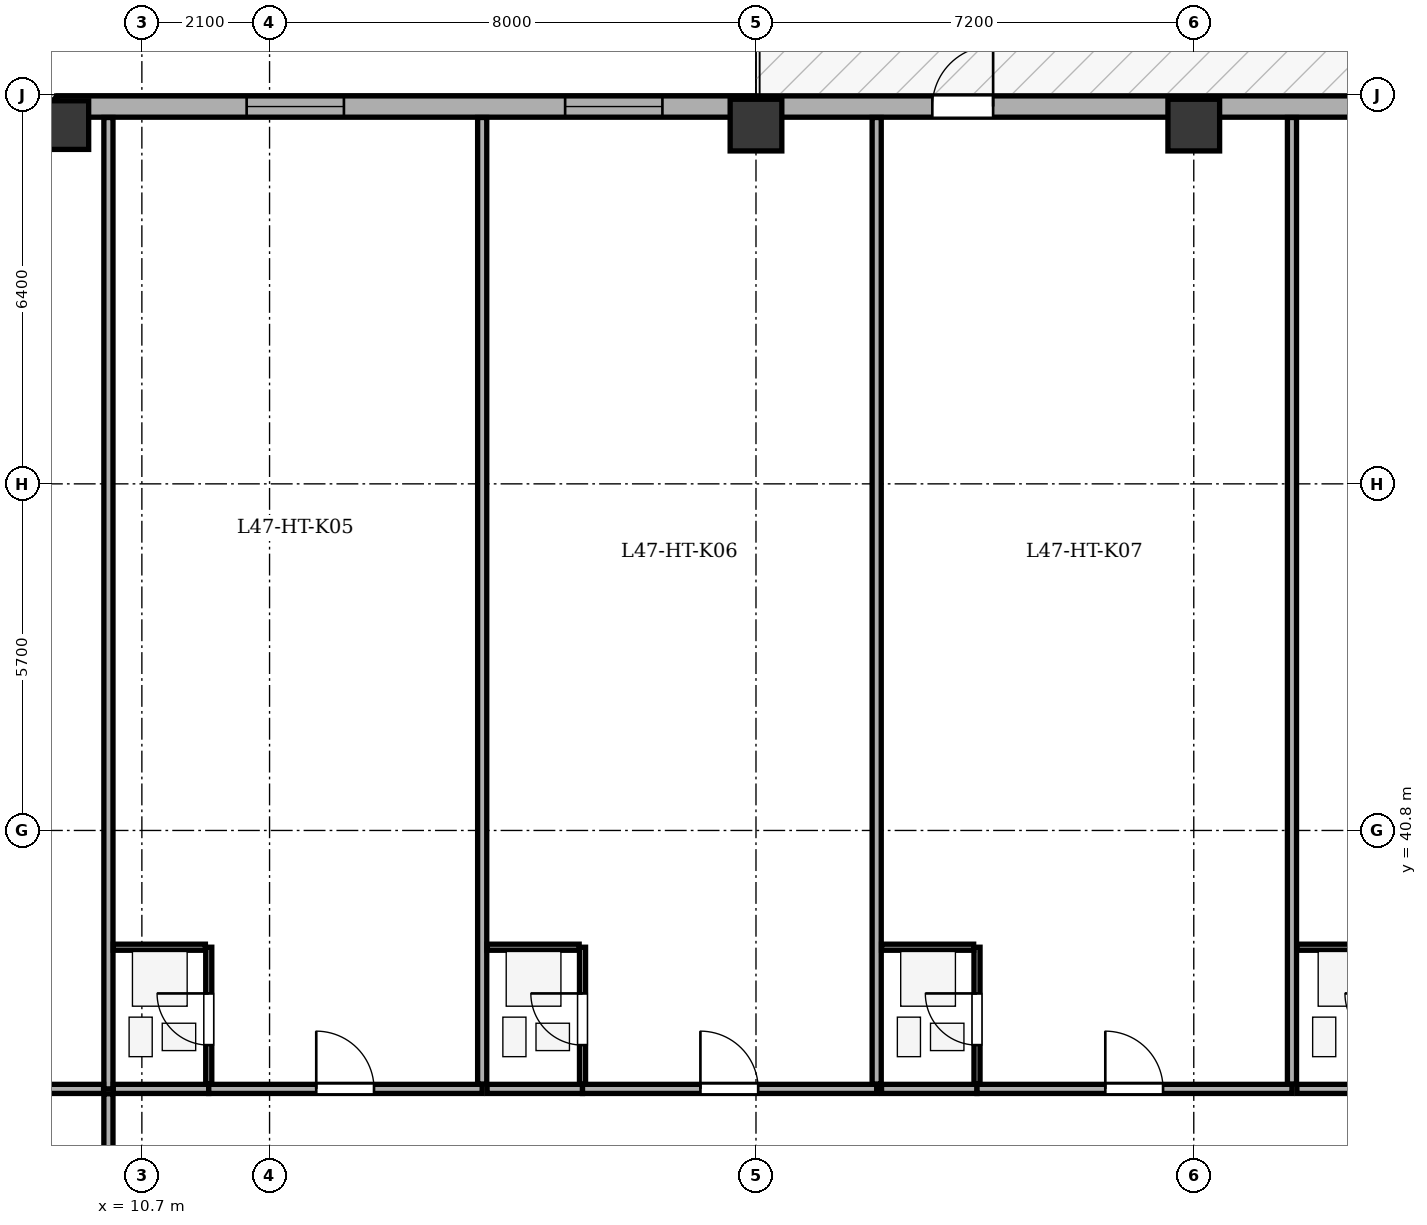
"""IFC4 building model, lengths in metres.
Left out: names, types, materials, properties, quantities, classifications, styles, units other than length and angle.
Written with IfcOpenShell. Run it as: python <this file> out.ifc"""

import sys

from ifc_helpers import new_model, si_unit, direction, frame, frame_2d, origin, origin_2d, place, context, subcontext, project, spatial, rectangle, extrude, element, fill, save


model = new_model("IFC4")
c1 = context("Model", 3, precision=1e-05, world=origin(), true_north=direction((0.0, 1.0)))
c2 = subcontext(c1, "Body", "Model", "MODEL_VIEW")
j1 = project(units=[si_unit("LENGTHUNIT", "METRE"), si_unit("PLANEANGLEUNIT", "RADIAN")], contexts=[c1])
p1 = place(None, origin())
s1 = spatial("IfcSite", under=j1, at=p1, CompositionType="ELEMENT")
p2 = place(p1, origin())
s2 = spatial("IfcBuilding", under=s1, at=p2, CompositionType="ELEMENT")
p3 = place(p2, frame((0.0, 0.0, 183.3)))
s3 = spatial("IfcBuildingStorey", under=s2, at=p3, CompositionType="ELEMENT", Elevation=183.3)
p4 = place(p3, frame((9.3, 52.4, 0.0), z_axis=(0.0, 0.0, 1.0), x_axis=(1.0, 0.0, 0.0)))
e1 = element("IfcColumn", 1, at=p4, inside=s3, PredefinedType="COLUMN", context=c2, shape_type="SweptSolid", body=[
    extrude(rectangle(XDim=0.8, YDim=1.05, at=origin_2d()), origin(), (0.0, 0.0, 1.0), 3.5),
])
for number, where, z_axis, x_axis in (
    (2, (20.8, 52.4, 0.0), (0.0, 0.0, 1.0), (1.0, 0.0, 0.0)),
    (3, (28.0, 52.4, 0.0), (0.0, 0.0, 1.0), (1.0, 0.0, 0.0)),
):
    element("IfcColumn", number, at=place(p3, frame(where, z_axis=z_axis, x_axis=x_axis)), inside=s3, PredefinedType="COLUMN", context=c2, shape_type="SweptSolid", body=[
        extrude(rectangle(XDim=0.85, YDim=0.85, at=origin_2d()), origin(), (0.0, 0.0, 1.0), 3.5),
    ])
p5 = place(p3, frame((4.495, 47.9, 0.0), z_axis=(0.0, 0.0, 1.0), x_axis=(0.707088817216, 0.7071247447, 0.0)))
e4 = element("IfcWall", 4, at=p5, inside=s3, PredefinedType="STANDARD", context=c2, shape_type="SweptSolid", body=[
    extrude(rectangle(XDim=6.795, YDim=0.35, at=frame_2d((3.398, 0.0))), origin(), (0.0, 0.0, 1.0), 2.785),
])
p6 = place(p5, frame((2.698, 0.0, 0.75)))
e5 = element("IfcOpeningElement", 5, at=p6, cuts=e4, PredefinedType="OPENING", context=c2, shape_type="SweptSolid", body=[
    extrude(rectangle(XDim=1.4, YDim=1.65, at=frame_2d((0.7, 0.825))), frame((0.0, 0.185, 0.0), z_axis=(0.0, -1.0, 0.0), x_axis=(1.0, 0.0, 0.0)), (0.0, 0.0, 1.0), 0.37),
])
p7 = place(p3, frame((9.3, 52.705, 0.0), z_axis=(0.0, 0.0, 1.0), x_axis=(1.0, 0.0, 0.0)))
e6 = element("IfcWall", 6, at=p7, inside=s3, PredefinedType="STANDARD", context=c2, shape_type="SweptSolid", body=[
    extrude(rectangle(XDim=35.0, YDim=0.35, at=frame_2d((17.5, 0.0))), origin(), (0.0, 0.0, 1.0), 2.785),
])
p8 = place(p7, frame((14.4, 0.0, 0.0)))
e7 = element("IfcOpeningElement", 7, at=p8, cuts=e6, PredefinedType="OPENING", context=c2, shape_type="SweptSolid", body=[
    extrude(rectangle(XDim=1.0, YDim=2.02, at=frame_2d((0.5, 1.01))), frame((0.0, 0.185, 0.0), z_axis=(0.0, -1.0, 0.0), x_axis=(1.0, 0.0, 0.0)), (0.0, 0.0, 1.0), 0.37),
])
p9 = place(p7, frame((3.123, 0.0, 0.75)))
e8 = element("IfcOpeningElement", 8, at=p9, cuts=e6, PredefinedType="OPENING", context=c2, shape_type="SweptSolid", body=[
    extrude(rectangle(XDim=1.6, YDim=1.75, at=frame_2d((0.8, 0.875))), frame((0.0, 0.185, 0.0), z_axis=(0.0, -1.0, 0.0), x_axis=(1.0, 0.0, 0.0)), (0.0, 0.0, 1.0), 0.37),
])
p10 = place(p7, frame((8.361, 0.0, 0.75)))
e9 = element("IfcOpeningElement", 9, at=p10, cuts=e6, PredefinedType="OPENING", context=c2, shape_type="SweptSolid", body=[
    extrude(rectangle(XDim=1.6, YDim=1.75, at=frame_2d((0.8, 0.875))), frame((0.0, 0.185, 0.0), z_axis=(0.0, -1.0, 0.0), x_axis=(1.0, 0.0, 0.0)), (0.0, 0.0, 1.0), 0.37),
])
p11 = place(p7, frame((22.22, 0.0, 0.75)))
e10 = element("IfcOpeningElement", 10, at=p11, cuts=e6, PredefinedType="OPENING", context=c2, shape_type="SweptSolid", body=[
    extrude(rectangle(XDim=1.6, YDim=1.75, at=frame_2d((0.8, 0.875))), frame((0.0, 0.185, 0.0), z_axis=(0.0, -1.0, 0.0), x_axis=(1.0, 0.0, 0.0)), (0.0, 0.0, 1.0), 0.37),
])
p12 = place(p7, frame((28.809, 0.0, 0.75)))
e11 = element("IfcOpeningElement", 11, at=p12, cuts=e6, PredefinedType="OPENING", context=c2, shape_type="SweptSolid", body=[
    extrude(rectangle(XDim=1.6, YDim=1.75, at=frame_2d((0.8, 0.875))), frame((0.0, 0.185, 0.0), z_axis=(0.0, -1.0, 0.0), x_axis=(1.0, 0.0, 0.0)), (0.0, 0.0, 1.0), 0.37),
])
p13 = place(p7, frame((31.803, 0.0, 0.75)))
e12 = element("IfcOpeningElement", 12, at=p13, cuts=e6, PredefinedType="OPENING", context=c2, shape_type="SweptSolid", body=[
    extrude(rectangle(XDim=1.6, YDim=1.75, at=frame_2d((0.8, 0.875))), frame((0.0, 0.185, 0.0), z_axis=(0.0, -1.0, 0.0), x_axis=(1.0, 0.0, 0.0)), (0.0, 0.0, 1.0), 0.37),
])
p14 = place(p3, frame((10.15, 36.55, 0.0), z_axis=(0.0, 0.0, 1.0), x_axis=(0.0, 1.0, 0.0)))
e13 = element("IfcWall", 13, at=p14, inside=s3, PredefinedType="PARTITIONING", context=c2, shape_type="SweptSolid", body=[
    extrude(rectangle(XDim=15.975, YDim=0.15, at=frame_2d((7.987, 0.0))), origin(), (0.0, 0.0, 1.0), 3.2),
])
p15 = place(p3, frame((10.23, 36.55, 0.0), z_axis=(0.0, 0.0, 1.0), x_axis=(1.0, 0.0, 0.0)))
e14 = element("IfcWall", 14, at=p15, inside=s3, PredefinedType="PARTITIONING", context=c2, shape_type="SweptSolid", body=[
    extrude(rectangle(XDim=1.57, YDim=0.15, at=frame_2d((0.785, 0.0))), origin(), (0.0, 0.0, 1.0), 3.2),
])
p16 = place(p3, frame((11.8, 36.55, 0.0), z_axis=(0.0, 0.0, 1.0), x_axis=(1.0, 0.0, 0.0)))
e15 = element("IfcWall", 15, at=p16, inside=s3, PredefinedType="PARTITIONING", context=c2, shape_type="SweptSolid", body=[
    extrude(rectangle(XDim=4.497, YDim=0.15, at=frame_2d((2.249, 0.0))), origin(), (0.0, 0.0, 1.0), 3.2),
])
p17 = place(p16, frame((1.768, 0.0, 0.0)))
e16 = element("IfcOpeningElement", 16, at=p17, cuts=e15, PredefinedType="OPENING", context=c2, shape_type="SweptSolid", body=[
    extrude(rectangle(XDim=0.95, YDim=2.1, at=frame_2d((0.475, 1.05))), frame((0.0, 0.085, 0.0), z_axis=(0.0, -1.0, 0.0), x_axis=(1.0, 0.0, 0.0)), (0.0, 0.0, 1.0), 0.17),
])
p18 = place(p3, frame((11.8, 36.63, 0.0), z_axis=(0.0, 0.0, 1.0), x_axis=(0.0, 1.0, 0.0)))
e17 = element("IfcWall", 17, at=p18, inside=s3, PredefinedType="PARTITIONING", context=c2, shape_type="SweptSolid", body=[
    extrude(rectangle(XDim=2.25, YDim=0.1, at=frame_2d((1.125, 0.0))), origin(), (0.0, 0.0, 1.0), 3.2),
])
p19 = place(p18, frame((0.64, 0.0, 0.0)))
e18 = element("IfcOpeningElement", 18, at=p19, cuts=e17, PredefinedType="OPENING", context=c2, shape_type="SweptSolid", body=[
    extrude(rectangle(XDim=0.85, YDim=2.05, at=frame_2d((0.425, 1.025))), frame((0.0, 0.06, 0.0), z_axis=(0.0, -1.0, 0.0), x_axis=(1.0, 0.0, 0.0)), (0.0, 0.0, 1.0), 0.12),
])
p20 = place(p3, frame((10.23, 38.88, 0.0), z_axis=(0.0, 0.0, 1.0), x_axis=(1.0, 0.0, 0.0)))
e19 = element("IfcWall", 19, at=p20, inside=s3, PredefinedType="PARTITIONING", context=c2, shape_type="SweptSolid", body=[
    extrude(rectangle(XDim=1.515, YDim=0.1, at=frame_2d((0.758, 0.0))), origin(), (0.0, 0.0, 1.0), 3.2),
])
p21 = place(p3, frame((16.297, 36.63, 0.0), z_axis=(0.0, 0.0, 1.0), x_axis=(0.0, 1.0, 0.0)))
e20 = element("IfcWall", 20, at=p21, inside=s3, PredefinedType="PARTITIONING", context=c2, shape_type="SweptSolid", body=[
    extrude(rectangle(XDim=15.895, YDim=0.15, at=frame_2d((7.948, 0.0))), origin(), (0.0, 0.0, 1.0), 3.2),
])
p22 = place(p3, frame((16.377, 36.55, 0.0), z_axis=(0.0, 0.0, 1.0), x_axis=(1.0, 0.0, 0.0)))
e21 = element("IfcWall", 21, at=p22, inside=s3, PredefinedType="PARTITIONING", context=c2, shape_type="SweptSolid", body=[
    extrude(rectangle(XDim=1.57, YDim=0.15, at=frame_2d((0.785, 0.0))), origin(), (0.0, 0.0, 1.0), 3.2),
])
p23 = place(p3, frame((17.947, 36.55, 0.0), z_axis=(0.0, 0.0, 1.0), x_axis=(1.0, 0.0, 0.0)))
e22 = element("IfcWall", 22, at=p23, inside=s3, PredefinedType="PARTITIONING", context=c2, shape_type="SweptSolid", body=[
    extrude(rectangle(XDim=4.838, YDim=0.15, at=frame_2d((2.419, 0.0))), origin(), (0.0, 0.0, 1.0), 3.2),
])
p24 = place(p23, frame((1.939, 0.0, 0.0)))
e23 = element("IfcOpeningElement", 23, at=p24, cuts=e22, PredefinedType="OPENING", context=c2, shape_type="SweptSolid", body=[
    extrude(rectangle(XDim=0.95, YDim=2.1, at=frame_2d((0.475, 1.05))), frame((0.0, 0.085, 0.0), z_axis=(0.0, -1.0, 0.0), x_axis=(1.0, 0.0, 0.0)), (0.0, 0.0, 1.0), 0.17),
])
p25 = place(p3, frame((17.947, 36.63, 0.0), z_axis=(0.0, 0.0, 1.0), x_axis=(0.0, 1.0, 0.0)))
e24 = element("IfcWall", 24, at=p25, inside=s3, PredefinedType="PARTITIONING", context=c2, shape_type="SweptSolid", body=[
    extrude(rectangle(XDim=2.25, YDim=0.1, at=frame_2d((1.125, 0.0))), origin(), (0.0, 0.0, 1.0), 3.2),
])
p26 = place(p25, frame((0.64, 0.0, 0.0)))
e25 = element("IfcOpeningElement", 25, at=p26, cuts=e24, PredefinedType="OPENING", context=c2, shape_type="SweptSolid", body=[
    extrude(rectangle(XDim=0.85, YDim=2.05, at=frame_2d((0.425, 1.025))), frame((0.0, 0.06, 0.0), z_axis=(0.0, -1.0, 0.0), x_axis=(1.0, 0.0, 0.0)), (0.0, 0.0, 1.0), 0.12),
])
p27 = place(p3, frame((16.377, 38.88, 0.0), z_axis=(0.0, 0.0, 1.0), x_axis=(1.0, 0.0, 0.0)))
e26 = element("IfcWall", 26, at=p27, inside=s3, PredefinedType="PARTITIONING", context=c2, shape_type="SweptSolid", body=[
    extrude(rectangle(XDim=1.515, YDim=0.1, at=frame_2d((0.758, 0.0))), origin(), (0.0, 0.0, 1.0), 3.2),
])
p28 = place(p3, frame((22.785, 36.63, 0.0), z_axis=(0.0, 0.0, 1.0), x_axis=(0.0, 1.0, 0.0)))
e27 = element("IfcWall", 27, at=p28, inside=s3, PredefinedType="PARTITIONING", context=c2, shape_type="SweptSolid", body=[
    extrude(rectangle(XDim=15.895, YDim=0.15, at=frame_2d((7.948, 0.0))), origin(), (0.0, 0.0, 1.0), 3.2),
])
p29 = place(p3, frame((22.865, 36.55, 0.0), z_axis=(0.0, 0.0, 1.0), x_axis=(1.0, 0.0, 0.0)))
e28 = element("IfcWall", 28, at=p29, inside=s3, PredefinedType="PARTITIONING", context=c2, shape_type="SweptSolid", body=[
    extrude(rectangle(XDim=1.57, YDim=0.15, at=frame_2d((0.785, 0.0))), origin(), (0.0, 0.0, 1.0), 3.2),
])
p30 = place(p3, frame((24.435, 36.55, 0.0), z_axis=(0.0, 0.0, 1.0), x_axis=(1.0, 0.0, 0.0)))
e29 = element("IfcWall", 29, at=p30, inside=s3, PredefinedType="PARTITIONING", context=c2, shape_type="SweptSolid", body=[
    extrude(rectangle(XDim=5.18, YDim=0.15, at=frame_2d((2.59, 0.0))), origin(), (0.0, 0.0, 1.0), 3.2),
])
p31 = place(p30, frame((2.11, 0.0, 0.0)))
e30 = element("IfcOpeningElement", 30, at=p31, cuts=e29, PredefinedType="OPENING", context=c2, shape_type="SweptSolid", body=[
    extrude(rectangle(XDim=0.95, YDim=2.1, at=frame_2d((0.475, 1.05))), frame((0.0, 0.085, 0.0), z_axis=(0.0, -1.0, 0.0), x_axis=(1.0, 0.0, 0.0)), (0.0, 0.0, 1.0), 0.17),
])
p32 = place(p3, frame((24.435, 36.63, 0.0), z_axis=(0.0, 0.0, 1.0), x_axis=(0.0, 1.0, 0.0)))
e31 = element("IfcWall", 31, at=p32, inside=s3, PredefinedType="PARTITIONING", context=c2, shape_type="SweptSolid", body=[
    extrude(rectangle(XDim=2.25, YDim=0.1, at=frame_2d((1.125, 0.0))), origin(), (0.0, 0.0, 1.0), 3.2),
])
p33 = place(p32, frame((0.64, 0.0, 0.0)))
e32 = element("IfcOpeningElement", 32, at=p33, cuts=e31, PredefinedType="OPENING", context=c2, shape_type="SweptSolid", body=[
    extrude(rectangle(XDim=0.85, YDim=2.05, at=frame_2d((0.425, 1.025))), frame((0.0, 0.06, 0.0), z_axis=(0.0, -1.0, 0.0), x_axis=(1.0, 0.0, 0.0)), (0.0, 0.0, 1.0), 0.12),
])
p34 = place(p3, frame((22.865, 38.88, 0.0), z_axis=(0.0, 0.0, 1.0), x_axis=(1.0, 0.0, 0.0)))
e33 = element("IfcWall", 33, at=p34, inside=s3, PredefinedType="PARTITIONING", context=c2, shape_type="SweptSolid", body=[
    extrude(rectangle(XDim=1.515, YDim=0.1, at=frame_2d((0.757, 0.0))), origin(), (0.0, 0.0, 1.0), 3.2),
])
p35 = place(p3, frame((29.615, 36.63, 0.0), z_axis=(0.0, 0.0, 1.0), x_axis=(0.0, 1.0, 0.0)))
e34 = element("IfcWall", 34, at=p35, inside=s3, PredefinedType="PARTITIONING", context=c2, shape_type="SweptSolid", body=[
    extrude(rectangle(XDim=15.895, YDim=0.15, at=frame_2d((7.948, 0.0))), origin(), (0.0, 0.0, 1.0), 2.785),
])
p36 = place(p3, frame((29.695, 36.55, 0.0), z_axis=(0.0, 0.0, 1.0), x_axis=(1.0, 0.0, 0.0)))
e35 = element("IfcWall", 35, at=p36, inside=s3, PredefinedType="PARTITIONING", context=c2, shape_type="SweptSolid", body=[
    extrude(rectangle(XDim=1.641, YDim=0.15, at=frame_2d((0.821, 0.0))), origin(), (0.0, 0.0, 1.0), 3.2),
])
p37 = place(p3, frame((29.695, 38.88, 0.0), z_axis=(0.0, 0.0, 1.0), x_axis=(1.0, 0.0, 0.0)))
e36 = element("IfcWall", 36, at=p37, inside=s3, PredefinedType="PARTITIONING", context=c2, shape_type="SweptSolid", body=[
    extrude(rectangle(XDim=1.586, YDim=0.1, at=frame_2d((0.793, 0.0))), origin(), (0.0, 0.0, 1.0), 3.2),
])
p38 = place(p3, frame((4.675, 36.55, 0.0), z_axis=(0.0, 0.0, 1.0), x_axis=(1.0, 0.0, 0.0)))
e37 = element("IfcWall", 37, at=p38, inside=s3, PredefinedType="PARTITIONING", context=c2, shape_type="SweptSolid", body=[
    extrude(rectangle(XDim=5.395, YDim=0.15, at=frame_2d((2.698, 0.0))), origin(), (0.0, 0.0, 1.0), 3.2),
])
p39 = place(p3, frame((10.15, 17.93, 0.0), z_axis=(0.0, 0.0, 1.0), x_axis=(0.0, 1.0, 0.0)))
e38 = element("IfcWall", 38, at=p39, inside=s3, PredefinedType="PARTITIONING", context=c2, shape_type="SweptSolid", body=[
    extrude(rectangle(XDim=18.54, YDim=0.15, at=frame_2d((9.27, 0.0))), origin(), (0.0, 0.0, 1.0), 3.2),
])
p40 = place(p39, frame((8.79, 0.0, 0.0)))
e39 = element("IfcOpeningElement", 39, at=p40, cuts=e38, PredefinedType="OPENING", context=c2, shape_type="SweptSolid", body=[
    extrude(rectangle(XDim=0.95, YDim=2.1, at=frame_2d((0.475, 1.05))), frame((0.0, 0.085, 0.0), z_axis=(0.0, -1.0, 0.0), x_axis=(1.0, 0.0, 0.0)), (0.0, 0.0, 1.0), 0.17),
])
p41 = place(p8, origin())
e40 = element("IfcDoor", 40, at=p41, inside=s3, OperationType="SINGLE_SWING_RIGHT", PredefinedType="DOOR", context=c2, shape_type="SweptSolid", body=[
    extrude(rectangle(XDim=1.0, YDim=2.02, at=frame_2d((0.5, 1.01))), frame((0.0, 0.025, 0.0), z_axis=(0.0, -1.0, 0.0), x_axis=(1.0, 0.0, 0.0)), (0.0, 0.0, 1.0), 0.05),
])
fill(e7, e40)
p42 = place(p9, origin())
e41 = element("IfcWindow", 41, at=p42, inside=s3, PartitioningType="SINGLE_PANEL", PredefinedType="WINDOW", context=c2, shape_type="SweptSolid", body=[
    extrude(rectangle(XDim=1.6, YDim=1.75, at=frame_2d((0.8, 0.875))), frame((0.0, -0.01, 0.0), z_axis=(0.0, -1.0, 0.0), x_axis=(1.0, 0.0, 0.0)), (0.0, 0.0, 1.0), 0.06),
])
fill(e8, e41)
p43 = place(p10, origin())
e42 = element("IfcWindow", 42, at=p43, inside=s3, PartitioningType="SINGLE_PANEL", PredefinedType="WINDOW", context=c2, shape_type="SweptSolid", body=[
    extrude(rectangle(XDim=1.6, YDim=1.75, at=frame_2d((0.8, 0.875))), frame((0.0, -0.01, 0.0), z_axis=(0.0, -1.0, 0.0), x_axis=(1.0, 0.0, 0.0)), (0.0, 0.0, 1.0), 0.06),
])
fill(e9, e42)
p44 = place(p19, origin())
e43 = element("IfcDoor", 43, at=p44, inside=s3, OperationType="SINGLE_SWING_RIGHT", PredefinedType="DOOR", context=c2, shape_type="SweptSolid", body=[
    extrude(rectangle(XDim=0.85, YDim=2.05, at=frame_2d((0.425, 1.025))), frame((0.0, 0.025, 0.0), z_axis=(0.0, -1.0, 0.0), x_axis=(1.0, 0.0, 0.0)), (0.0, 0.0, 1.0), 0.05),
])
fill(e18, e43)
p45 = place(p17, origin())
e44 = element("IfcDoor", 44, at=p45, inside=s3, OperationType="SINGLE_SWING_LEFT", PredefinedType="DOOR", context=c2, shape_type="SweptSolid", body=[
    extrude(rectangle(XDim=0.95, YDim=2.1, at=frame_2d((0.475, 1.05))), frame((0.0, 0.025, 0.0), z_axis=(0.0, -1.0, 0.0), x_axis=(1.0, 0.0, 0.0)), (0.0, 0.0, 1.0), 0.05),
])
fill(e16, e44)
p46 = place(p26, origin())
e45 = element("IfcDoor", 45, at=p46, inside=s3, OperationType="SINGLE_SWING_RIGHT", PredefinedType="DOOR", context=c2, shape_type="SweptSolid", body=[
    extrude(rectangle(XDim=0.85, YDim=2.05, at=frame_2d((0.425, 1.025))), frame((0.0, 0.025, 0.0), z_axis=(0.0, -1.0, 0.0), x_axis=(1.0, 0.0, 0.0)), (0.0, 0.0, 1.0), 0.05),
])
fill(e25, e45)
p47 = place(p24, origin())
e46 = element("IfcDoor", 46, at=p47, inside=s3, OperationType="SINGLE_SWING_LEFT", PredefinedType="DOOR", context=c2, shape_type="SweptSolid", body=[
    extrude(rectangle(XDim=0.95, YDim=2.1, at=frame_2d((0.475, 1.05))), frame((0.0, 0.025, 0.0), z_axis=(0.0, -1.0, 0.0), x_axis=(1.0, 0.0, 0.0)), (0.0, 0.0, 1.0), 0.05),
])
fill(e23, e46)
p48 = place(p33, origin())
e47 = element("IfcDoor", 47, at=p48, inside=s3, OperationType="SINGLE_SWING_RIGHT", PredefinedType="DOOR", context=c2, shape_type="SweptSolid", body=[
    extrude(rectangle(XDim=0.85, YDim=2.05, at=frame_2d((0.425, 1.025))), frame((0.0, 0.025, 0.0), z_axis=(0.0, -1.0, 0.0), x_axis=(1.0, 0.0, 0.0)), (0.0, 0.0, 1.0), 0.05),
])
fill(e32, e47)
p49 = place(p31, origin())
e48 = element("IfcDoor", 48, at=p49, inside=s3, OperationType="SINGLE_SWING_LEFT", PredefinedType="DOOR", context=c2, shape_type="SweptSolid", body=[
    extrude(rectangle(XDim=0.95, YDim=2.1, at=frame_2d((0.475, 1.05))), frame((0.0, 0.025, 0.0), z_axis=(0.0, -1.0, 0.0), x_axis=(1.0, 0.0, 0.0)), (0.0, 0.0, 1.0), 0.05),
])
fill(e30, e48)
save(model, sys.argv[1])
